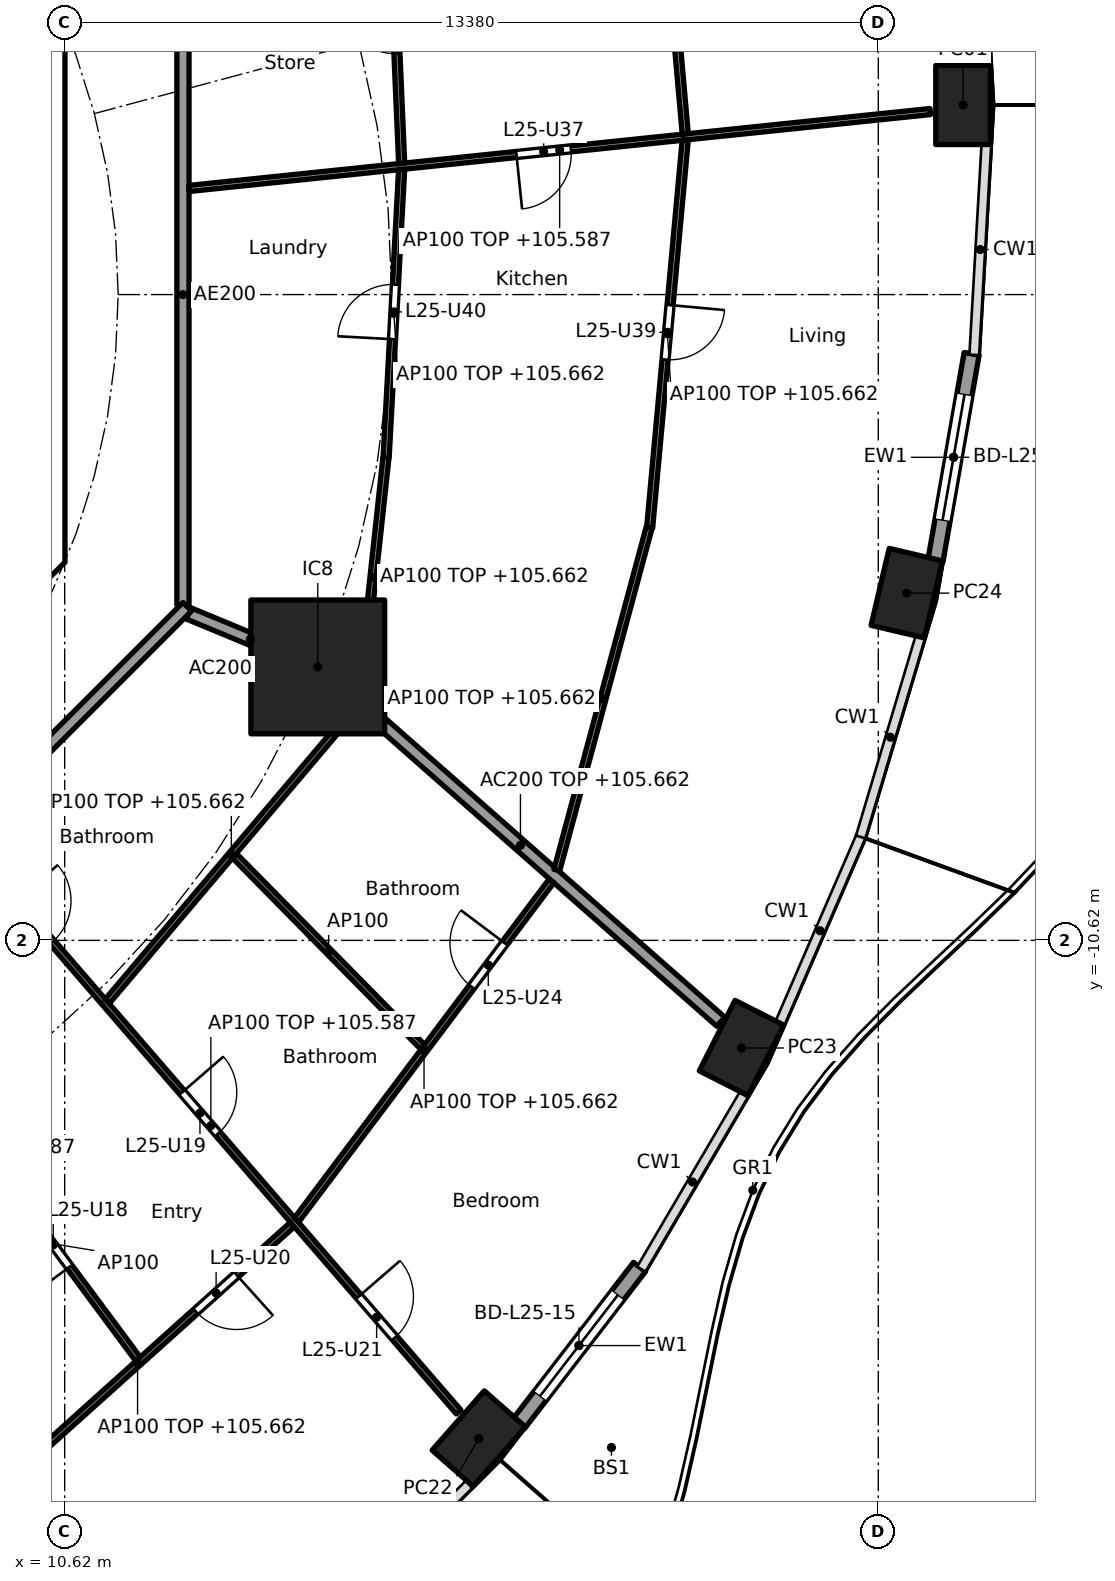
"""IFC4 building model, lengths in metres.
Left out: names, types, materials, properties, quantities, classifications, styles, units other than length and angle.
Written with IfcOpenShell. Run it as: python <this file> out.ifc"""

import sys

from ifc_helpers import new_model, si_unit, direction, frame, frame_2d, origin, origin_2d, place, context, subcontext, project, spatial, polyline, rectangle, hollow_rectangle, outline, extrude, element, fill, save


model = new_model("IFC4")
c1 = context("Model", 3, precision=1e-05, world=origin(), true_north=direction((0.0, 1.0)))
c2 = subcontext(c1, "Body", "Model", "MODEL_VIEW")
j1 = project(units=[si_unit("LENGTHUNIT", "METRE"), si_unit("PLANEANGLEUNIT", "RADIAN")], contexts=[c1])
p1 = place(None, origin())
s1 = spatial("IfcSite", under=j1, at=p1, CompositionType="ELEMENT")
p2 = place(p1, origin())
s2 = spatial("IfcBuilding", under=s1, at=p2, CompositionType="ELEMENT")
p3 = place(p2, frame((0.0, 0.0, 102.9)))
s3 = spatial("IfcBuildingStorey", under=s2, at=p3, CompositionType="ELEMENT", Elevation=102.9)
for number, where, z_axis, x_axis in (
    (1, (25.395, 3.118, 0.0), (0.0, 0.0, 1.0), (0.0, 1.0, 0.0)),
    (2, (17.43, -18.813, 0.0), (0.0, 0.0, 1.0), (0.66, 0.751, 0.0)),
    (3, (21.751, -12.39, 0.0), (0.0, 0.0, 1.0), (0.452, 0.892, 0.0)),
    (4, (24.468, -4.91, 0.0), (0.0, 0.0, 1.0), (0.229, 0.973, 0.0)),
):
    element("IfcColumn", number, at=place(p3, frame(where, z_axis=z_axis, x_axis=x_axis)), inside=s3, PredefinedType="COLUMN", context=c2, shape_type="SweptSolid", body=[
        extrude(hollow_rectangle(XDim=1.3, YDim=0.9, WallThickness=0.045, at=origin_2d()), origin(), (0.0, 0.0, 1.0), 3.7),
    ])
p4 = place(p3, frame((14.782, -6.123, 0.0), z_axis=(0.0, 0.0, 1.0), x_axis=(1.0, 0.0, 0.0)))
e5 = element("IfcColumn", 5, at=p4, inside=s3, PredefinedType="COLUMN", context=c2, shape_type="SweptSolid", body=[
    extrude(rectangle(XDim=2.2, YDim=2.2, at=origin_2d()), origin(), (0.0, 0.0, 1.0), 3.7),
])
p5 = place(p3, frame((20.073, -15.991, 0.0), z_axis=(0.0, 0.0, 1.0), x_axis=(-0.610458970322, -0.792047880847, 0.0)))
e6 = element("IfcWall", 6, at=p5, inside=s3, PredefinedType="SOLIDWALL", context=c2, shape_type="SweptSolid", body=[
    extrude(rectangle(XDim=3.263, YDim=0.25, at=frame_2d((1.631, 0.0))), origin(), (0.0, 0.0, 1.0), 3.44),
])
p6 = place(p5, frame((0.582, 0.0, 0.0)))
e7 = element("IfcOpeningElement", 7, at=p6, cuts=e6, PredefinedType="OPENING", context=c2, shape_type="SweptSolid", body=[
    extrude(rectangle(XDim=2.1, YDim=2.4, at=frame_2d((1.05, 1.2))), frame((0.0, 0.135, 0.0), z_axis=(0.0, -1.0, 0.0), x_axis=(1.0, 0.0, 0.0)), (0.0, 0.0, 1.0), 0.27),
])
p7 = place(p3, frame((25.535, -0.974, 0.0), z_axis=(0.0, 0.0, 1.0), x_axis=(-0.172164316671, -0.985068245385, 0.0)))
e8 = element("IfcWall", 8, at=p7, inside=s3, PredefinedType="SOLIDWALL", context=c2, shape_type="SweptSolid", body=[
    extrude(rectangle(XDim=3.454, YDim=0.25, at=frame_2d((1.727, 0.0))), origin(), (0.0, 0.0, 1.0), 3.44),
])
p8 = place(p7, frame((0.677, 0.0, 0.0)))
e9 = element("IfcOpeningElement", 9, at=p8, cuts=e8, PredefinedType="OPENING", context=c2, shape_type="SweptSolid", body=[
    extrude(rectangle(XDim=2.1, YDim=2.4, at=frame_2d((1.05, 1.2))), frame((0.0, 0.135, 0.0), z_axis=(0.0, -1.0, 0.0), x_axis=(1.0, 0.0, 0.0)), (0.0, 0.0, 1.0), 0.27),
])
p9 = place(p3, origin())
e10 = element("IfcWall", 10, at=p9, inside=s3, PredefinedType="SHEAR", context=c2, shape_type="SweptSolid", body=[
    extrude(outline(polyline([(9.776, -4.401), (10.025, -4.152), (10.025, -3.801), (10.025, 4.152), (9.776, 4.401), (10.2, 4.825), (10.625, 4.401), (10.625, -4.401), (10.2, -4.825), (9.776, -4.401)])), origin(), (0.0, 0.0, 1.0), 3.44),
])
p10 = place(p3, frame((12.657, -5.243, 0.0), z_axis=(0.0, 0.0, 1.0), x_axis=(0.923876145736, -0.382691608661, 0.0)))
e11 = element("IfcWall", 11, at=p10, inside=s3, PredefinedType="PARTITIONING", context=c2, shape_type="SweptSolid", body=[
    extrude(rectangle(XDim=2.2, YDim=0.2, at=frame_2d((1.1, 0.0))), origin(), (0.0, 0.0, 1.0), 3.44),
])
p11 = place(p3, frame((14.82, -6.156, 0.0), z_axis=(0.0, 0.0, 1.0), x_axis=(0.750582231659, -0.660777052808, 0.0)))
e12 = element("IfcWall", 12, at=p11, inside=s3, PredefinedType="PARTITIONING", context=c2, shape_type="SweptSolid", body=[
    extrude(rectangle(XDim=8.781, YDim=0.2, at=frame_2d((4.391, 0.0))), origin(), (0.0, 0.0, 1.0), 2.762),
])
p12 = place(p3, frame((12.565, -5.104, 0.0), z_axis=(0.0, 0.0, 1.0), x_axis=(0.0, 1.0, 0.0)))
e13 = element("IfcWall", 13, at=p12, inside=s3, PredefinedType="PARTITIONING", context=c2, shape_type="SweptSolid", body=[
    extrude(rectangle(XDim=10.209, YDim=0.2, at=frame_2d((5.104, 0.0))), origin(), (0.0, 0.0, 1.0), 3.44),
])
p13 = place(p3, frame((5.275, -12.494, 0.0), z_axis=(0.0, 0.0, 1.0), x_axis=(0.707106781187, 0.707106781187, 0.0)))
e14 = element("IfcWall", 14, at=p13, inside=s3, PredefinedType="PARTITIONING", context=c2, shape_type="SweptSolid", body=[
    extrude(rectangle(XDim=10.409, YDim=0.2, at=frame_2d((5.205, 0.0))), origin(), (0.0, 0.0, 1.0), 3.44),
])
p14 = place(p13, frame((3.303, 0.0, 0.0)))
e15 = element("IfcOpeningElement", 15, at=p14, cuts=e14, PredefinedType="OPENING", context=c2, shape_type="SweptSolid", body=[
    extrude(rectangle(XDim=1.0, YDim=2.1, at=frame_2d((0.5, 1.05))), frame((0.0, 0.11, 0.0), z_axis=(0.0, -1.0, 0.0), x_axis=(1.0, 0.0, 0.0)), (0.0, 0.0, 1.0), 0.22),
])
p15 = place(p3, frame((12.664, 1.745, 0.0), z_axis=(0.0, 0.0, 1.0), x_axis=(0.994662790212, 0.103179134358, 0.0)))
e16 = element("IfcWall", 16, at=p15, inside=s3, PredefinedType="PARTITIONING", context=c2, shape_type="SweptSolid", body=[
    extrude(rectangle(XDim=12.257, YDim=0.1, at=frame_2d((6.128, 0.0))), origin(), (0.0, 0.0, 1.0), 2.687),
])
p16 = place(p15, frame((5.414, 0.0, 0.0)))
e17 = element("IfcOpeningElement", 17, at=p16, cuts=e16, PredefinedType="OPENING", context=c2, shape_type="SweptSolid", body=[
    extrude(rectangle(XDim=0.9, YDim=2.1, at=frame_2d((0.45, 1.05))), frame((0.0, 0.06, 0.0), z_axis=(0.0, -1.0, 0.0), x_axis=(1.0, 0.0, 0.0)), (0.0, 0.0, 1.0), 0.12),
])
p17 = place(p3, frame((16.162, 2.158, 0.0), z_axis=(0.0, 0.0, 1.0), x_axis=(-0.043120653248, 0.999069872063, 0.0)))
e18 = element("IfcWall", 18, at=p17, inside=s3, PredefinedType="PARTITIONING", context=c2, shape_type="SweptSolid", body=[
    extrude(rectangle(XDim=4.518, YDim=0.1, at=frame_2d((2.259, 0.0))), origin(), (0.0, 0.0, 1.0), 3.44),
])
p18 = place(p17, frame((1.809, 0.0, 0.0)))
e19 = element("IfcOpeningElement", 19, at=p18, cuts=e18, PredefinedType="OPENING", context=c2, shape_type="SweptSolid", body=[
    extrude(rectangle(XDim=0.9, YDim=2.1, at=frame_2d((0.45, 1.05))), frame((0.0, 0.06, 0.0), z_axis=(0.0, -1.0, 0.0), x_axis=(1.0, 0.0, 0.0)), (0.0, 0.0, 1.0), 0.12),
])
p19 = place(p3, frame((16.161, 2.058, 0.0), z_axis=(0.0, 0.0, 1.0), x_axis=(-0.053696394729, -0.998557307916, 0.0)))
e20 = element("IfcWall", 20, at=p19, inside=s3, PredefinedType="PARTITIONING", context=c2, shape_type="SweptSolid", body=[
    extrude(rectangle(XDim=4.742, YDim=0.1, at=frame_2d((2.371, 0.0))), origin(), (0.0, 0.0, 1.0), 2.762),
])
p20 = place(p19, frame((1.896, 0.0, 0.0)))
e21 = element("IfcOpeningElement", 21, at=p20, cuts=e20, PredefinedType="OPENING", context=c2, shape_type="SweptSolid", body=[
    extrude(rectangle(XDim=0.9, YDim=2.1, at=frame_2d((0.45, 1.05))), frame((0.0, 0.06, 0.0), z_axis=(0.0, -1.0, 0.0), x_axis=(1.0, 0.0, 0.0)), (0.0, 0.0, 1.0), 0.12),
])
p21 = place(p3, frame((20.825, 2.642, 0.0), z_axis=(0.0, 0.0, 1.0), x_axis=(-0.08776338161, 0.996141349834, 0.0)))
e22 = element("IfcWall", 22, at=p21, inside=s3, PredefinedType="PARTITIONING", context=c2, shape_type="SweptSolid", body=[
    extrude(rectangle(XDim=6.337, YDim=0.1, at=frame_2d((3.168, 0.0))), origin(), (0.0, 0.0, 1.0), 2.762),
])
p22 = place(p21, frame((2.694, 0.0, 0.0)))
e23 = element("IfcOpeningElement", 23, at=p22, cuts=e22, PredefinedType="OPENING", context=c2, shape_type="SweptSolid", body=[
    extrude(rectangle(XDim=0.9, YDim=2.1, at=frame_2d((0.45, 1.05))), frame((0.0, 0.06, 0.0), z_axis=(0.0, -1.0, 0.0), x_axis=(1.0, 0.0, 0.0)), (0.0, 0.0, 1.0), 0.12),
])
p23 = place(p3, frame((20.825, 2.542, 0.0), z_axis=(0.0, 0.0, 1.0), x_axis=(-0.09140211812, -0.995814065377, 0.0)))
e24 = element("IfcWall", 24, at=p23, inside=s3, PredefinedType="PARTITIONING", context=c2, shape_type="SweptSolid", body=[
    extrude(rectangle(XDim=6.403, YDim=0.1, at=frame_2d((3.201, 0.0))), origin(), (0.0, 0.0, 1.0), 2.762),
])
p24 = place(p23, frame((2.726, 0.0, 0.0)))
e25 = element("IfcOpeningElement", 25, at=p24, cuts=e24, PredefinedType="OPENING", context=c2, shape_type="SweptSolid", body=[
    extrude(rectangle(XDim=0.9, YDim=2.1, at=frame_2d((0.45, 1.05))), frame((0.0, 0.06, 0.0), z_axis=(0.0, -1.0, 0.0), x_axis=(1.0, 0.0, 0.0)), (0.0, 0.0, 1.0), 0.12),
])
p25 = place(p3, frame((9.272, -19.868, 0.0), z_axis=(0.0, 0.0, 1.0), x_axis=(0.743884413566, 0.668308296562, 0.0)))
e26 = element("IfcWall", 26, at=p25, inside=s3, PredefinedType="PARTITIONING", context=c2, shape_type="SweptSolid", body=[
    extrude(rectangle(XDim=6.845, YDim=0.1, at=frame_2d((3.423, 0.0))), origin(), (0.0, 0.0, 1.0), 2.762),
])
p26 = place(p25, frame((4.709, 0.0, 0.0)))
e27 = element("IfcOpeningElement", 27, at=p26, cuts=e26, PredefinedType="OPENING", context=c2, shape_type="SweptSolid", body=[
    extrude(rectangle(XDim=0.9, YDim=2.1, at=frame_2d((0.45, 1.05))), frame((0.0, 0.06, 0.0), z_axis=(0.0, -1.0, 0.0), x_axis=(1.0, 0.0, 0.0)), (0.0, 0.0, 1.0), 0.12),
])
p27 = place(p3, frame((9.008, -13.708, 0.0), z_axis=(0.0, 0.0, 1.0), x_axis=(0.595845850207, -0.803098825047, 0.0)))
e28 = element("IfcWall", 28, at=p27, inside=s3, PredefinedType="PARTITIONING", context=c2, shape_type="SweptSolid", body=[
    extrude(rectangle(XDim=4.729, YDim=0.1, at=frame_2d((2.365, 0.0))), origin(), (0.0, 0.0, 1.0), 3.44),
])
p28 = place(p27, frame((1.94, 0.0, 0.0)))
e29 = element("IfcOpeningElement", 29, at=p28, cuts=e28, PredefinedType="OPENING", context=c2, shape_type="SweptSolid", body=[
    extrude(rectangle(XDim=0.9, YDim=2.1, at=frame_2d((0.45, 1.05))), frame((0.0, 0.06, 0.0), z_axis=(0.0, -1.0, 0.0), x_axis=(1.0, 0.0, 0.0)), (0.0, 0.0, 1.0), 0.12),
])
p29 = place(p3, frame((8.95, -8.96, 0.0), z_axis=(0.0, 0.0, 1.0), x_axis=(0.65441081073, -0.756139200676, 0.0)))
e30 = element("IfcWall", 30, at=p29, inside=s3, PredefinedType="PARTITIONING", context=c2, shape_type="SweptSolid", body=[
    extrude(rectangle(XDim=12.451, YDim=0.1, at=frame_2d((6.226, 0.0))), origin(), (0.0, 0.0, 1.0), 2.687),
])
p30 = place(p29, frame((1.336, 0.0, 0.0)))
e31 = element("IfcOpeningElement", 31, at=p30, cuts=e30, PredefinedType="OPENING", context=c2, shape_type="SweptSolid", body=[
    extrude(rectangle(XDim=0.9, YDim=2.1, at=frame_2d((0.45, 1.05))), frame((0.0, 0.06, 0.0), z_axis=(0.0, -1.0, 0.0), x_axis=(1.0, 0.0, 0.0)), (0.0, 0.0, 1.0), 0.12),
])
p31 = place(p29, frame((5.501, 0.0, 0.0)))
e32 = element("IfcOpeningElement", 32, at=p31, cuts=e30, PredefinedType="OPENING", context=c2, shape_type="SweptSolid", body=[
    extrude(rectangle(XDim=0.9, YDim=2.1, at=frame_2d((0.45, 1.05))), frame((0.0, 0.06, 0.0), z_axis=(0.0, -1.0, 0.0), x_axis=(1.0, 0.0, 0.0)), (0.0, 0.0, 1.0), 0.12),
])
p32 = place(p29, frame((9.941, 0.0, 0.0)))
e33 = element("IfcOpeningElement", 33, at=p32, cuts=e30, PredefinedType="OPENING", context=c2, shape_type="SweptSolid", body=[
    extrude(rectangle(XDim=0.9, YDim=2.1, at=frame_2d((0.45, 1.05))), frame((0.0, 0.06, 0.0), z_axis=(0.0, -1.0, 0.0), x_axis=(1.0, 0.0, 0.0)), (0.0, 0.0, 1.0), 0.12),
])
p33 = place(p3, frame((11.32, -11.623, 0.0), z_axis=(0.0, 0.0, 1.0), x_axis=(0.646106810963, 0.763247003811, 0.0)))
e34 = element("IfcWall", 34, at=p33, inside=s3, PredefinedType="PARTITIONING", context=c2, shape_type="SweptSolid", body=[
    extrude(rectangle(XDim=6.317, YDim=0.1, at=frame_2d((3.159, 0.0))), origin(), (0.0, 0.0, 1.0), 2.762),
])
p34 = place(p3, frame((14.432, -15.219, 0.0), z_axis=(0.0, 0.0, 1.0), x_axis=(0.601001256685, 0.799248077548, 0.0)))
e35 = element("IfcWall", 35, at=p34, inside=s3, PredefinedType="PARTITIONING", context=c2, shape_type="SweptSolid", body=[
    extrude(rectangle(XDim=6.98, YDim=0.1, at=frame_2d((3.49, 0.0))), origin(), (0.0, 0.0, 1.0), 2.762),
])
p35 = place(p34, frame((4.798, 0.0, 0.0)))
e36 = element("IfcOpeningElement", 36, at=p35, cuts=e35, PredefinedType="OPENING", context=c2, shape_type="SweptSolid", body=[
    extrude(rectangle(XDim=0.9, YDim=2.1, at=frame_2d((0.45, 1.05))), frame((0.0, 0.06, 0.0), z_axis=(0.0, -1.0, 0.0), x_axis=(1.0, 0.0, 0.0)), (0.0, 0.0, 1.0), 0.12),
])
p36 = place(p3, frame((13.412, -9.229, 0.0), z_axis=(0.0, 0.0, 1.0), x_axis=(0.701611164285, -0.712560014421, 0.0)))
e37 = element("IfcWall", 37, at=p36, inside=s3, PredefinedType="PARTITIONING", context=c2, shape_type="SweptSolid", body=[
    extrude(rectangle(XDim=4.415, YDim=0.1, at=frame_2d((2.208, 0.0))), origin(), (0.0, 0.0, 1.0), 3.44),
])
p37 = place(p3, frame((15.477, -6.625, 0.0), z_axis=(0.0, 0.0, 1.0), x_axis=(0.107570517496, 0.994197457131, 0.0)))
e38 = element("IfcWall", 38, at=p37, inside=s3, PredefinedType="PARTITIONING", context=c2, shape_type="SweptSolid", body=[
    extrude(rectangle(XDim=3.972, YDim=0.1, at=frame_2d((1.986, 0.0))), origin(), (0.0, 0.0, 1.0), 2.762),
])
p38 = place(p3, frame((18.713, -9.464, 0.0), z_axis=(0.0, 0.0, 1.0), x_axis=(0.260279646259, 0.965533275316, 0.0)))
e39 = element("IfcWall", 39, at=p38, inside=s3, PredefinedType="PARTITIONING", context=c2, shape_type="SweptSolid", body=[
    extrude(rectangle(XDim=5.833, YDim=0.1, at=frame_2d((2.917, 0.0))), origin(), (0.0, 0.0, 1.0), 2.762),
])
p39 = place(p6, origin())
e40 = element("IfcDoor", 40, at=p39, inside=s3, OperationType="SLIDING_TO_LEFT", PredefinedType="DOOR", context=c2, shape_type="SweptSolid", body=[
    extrude(rectangle(XDim=2.1, YDim=2.4, at=frame_2d((1.05, 1.2))), frame((0.0, 0.025, 0.0), z_axis=(0.0, -1.0, 0.0), x_axis=(1.0, 0.0, 0.0)), (0.0, 0.0, 1.0), 0.05),
])
fill(e7, e40)
p40 = place(p8, origin())
e41 = element("IfcDoor", 41, at=p40, inside=s3, OperationType="SLIDING_TO_LEFT", PredefinedType="DOOR", context=c2, shape_type="SweptSolid", body=[
    extrude(rectangle(XDim=2.1, YDim=2.4, at=frame_2d((1.05, 1.2))), frame((0.0, 0.025, 0.0), z_axis=(0.0, -1.0, 0.0), x_axis=(1.0, 0.0, 0.0)), (0.0, 0.0, 1.0), 0.05),
])
fill(e9, e41)
p41 = place(p30, origin())
e42 = element("IfcDoor", 42, at=p41, inside=s3, OperationType="SINGLE_SWING_LEFT", PredefinedType="DOOR", context=c2, shape_type="SweptSolid", body=[
    extrude(rectangle(XDim=0.9, YDim=2.1, at=frame_2d((0.45, 1.05))), frame((0.0, 0.025, 0.0), z_axis=(0.0, -1.0, 0.0), x_axis=(1.0, 0.0, 0.0)), (0.0, 0.0, 1.0), 0.05),
])
fill(e31, e42)
p42 = place(p28, frame((0.9, 0.0, 0.0), x_axis=(-1.0, 0.0, 0.0)))
e43 = element("IfcDoor", 43, at=p42, inside=s3, OperationType="SINGLE_SWING_LEFT", PredefinedType="DOOR", context=c2, shape_type="SweptSolid", body=[
    extrude(rectangle(XDim=0.9, YDim=2.1, at=frame_2d((0.45, 1.05))), frame((0.0, 0.025, 0.0), z_axis=(0.0, -1.0, 0.0), x_axis=(1.0, 0.0, 0.0)), (0.0, 0.0, 1.0), 0.05),
])
fill(e29, e43)
p43 = place(p31, origin())
e44 = element("IfcDoor", 44, at=p43, inside=s3, OperationType="SINGLE_SWING_LEFT", PredefinedType="DOOR", context=c2, shape_type="SweptSolid", body=[
    extrude(rectangle(XDim=0.9, YDim=2.1, at=frame_2d((0.45, 1.05))), frame((0.0, 0.025, 0.0), z_axis=(0.0, -1.0, 0.0), x_axis=(1.0, 0.0, 0.0)), (0.0, 0.0, 1.0), 0.05),
])
fill(e32, e44)
p44 = place(p26, frame((0.9, 0.0, 0.0), x_axis=(-1.0, 0.0, 0.0)))
e45 = element("IfcDoor", 45, at=p44, inside=s3, OperationType="SINGLE_SWING_LEFT", PredefinedType="DOOR", context=c2, shape_type="SweptSolid", body=[
    extrude(rectangle(XDim=0.9, YDim=2.1, at=frame_2d((0.45, 1.05))), frame((0.0, 0.025, 0.0), z_axis=(0.0, -1.0, 0.0), x_axis=(1.0, 0.0, 0.0)), (0.0, 0.0, 1.0), 0.05),
])
fill(e27, e45)
p45 = place(p32, origin())
e46 = element("IfcDoor", 46, at=p45, inside=s3, OperationType="SINGLE_SWING_LEFT", PredefinedType="DOOR", context=c2, shape_type="SweptSolid", body=[
    extrude(rectangle(XDim=0.9, YDim=2.1, at=frame_2d((0.45, 1.05))), frame((0.0, 0.025, 0.0), z_axis=(0.0, -1.0, 0.0), x_axis=(1.0, 0.0, 0.0)), (0.0, 0.0, 1.0), 0.05),
])
fill(e33, e46)
p46 = place(p35, origin())
e47 = element("IfcDoor", 47, at=p46, inside=s3, OperationType="SINGLE_SWING_RIGHT", PredefinedType="DOOR", context=c2, shape_type="SweptSolid", body=[
    extrude(rectangle(XDim=0.9, YDim=2.1, at=frame_2d((0.45, 1.05))), frame((0.0, 0.025, 0.0), z_axis=(0.0, -1.0, 0.0), x_axis=(1.0, 0.0, 0.0)), (0.0, 0.0, 1.0), 0.05),
])
fill(e36, e47)
p47 = place(p18, origin())
e48 = element("IfcDoor", 48, at=p47, inside=s3, OperationType="SINGLE_SWING_RIGHT", PredefinedType="DOOR", context=c2, shape_type="SweptSolid", body=[
    extrude(rectangle(XDim=0.9, YDim=2.1, at=frame_2d((0.45, 1.05))), frame((0.0, 0.025, 0.0), z_axis=(0.0, -1.0, 0.0), x_axis=(1.0, 0.0, 0.0)), (0.0, 0.0, 1.0), 0.05),
])
fill(e19, e48)
p48 = place(p16, frame((0.9, 0.0, 0.0), x_axis=(-1.0, 0.0, 0.0)))
e49 = element("IfcDoor", 49, at=p48, inside=s3, OperationType="SINGLE_SWING_RIGHT", PredefinedType="DOOR", context=c2, shape_type="SweptSolid", body=[
    extrude(rectangle(XDim=0.9, YDim=2.1, at=frame_2d((0.45, 1.05))), frame((0.0, 0.025, 0.0), z_axis=(0.0, -1.0, 0.0), x_axis=(1.0, 0.0, 0.0)), (0.0, 0.0, 1.0), 0.05),
])
fill(e17, e49)
p49 = place(p24, origin())
e50 = element("IfcDoor", 50, at=p49, inside=s3, OperationType="SINGLE_SWING_LEFT", PredefinedType="DOOR", context=c2, shape_type="SweptSolid", body=[
    extrude(rectangle(XDim=0.9, YDim=2.1, at=frame_2d((0.45, 1.05))), frame((0.0, 0.025, 0.0), z_axis=(0.0, -1.0, 0.0), x_axis=(1.0, 0.0, 0.0)), (0.0, 0.0, 1.0), 0.05),
])
fill(e25, e50)
p50 = place(p20, frame((0.9, 0.0, 0.0), x_axis=(-1.0, 0.0, 0.0)))
e51 = element("IfcDoor", 51, at=p50, inside=s3, OperationType="SINGLE_SWING_LEFT", PredefinedType="DOOR", context=c2, shape_type="SweptSolid", body=[
    extrude(rectangle(XDim=0.9, YDim=2.1, at=frame_2d((0.45, 1.05))), frame((0.0, 0.025, 0.0), z_axis=(0.0, -1.0, 0.0), x_axis=(1.0, 0.0, 0.0)), (0.0, 0.0, 1.0), 0.05),
])
fill(e21, e51)
save(model, sys.argv[1])
